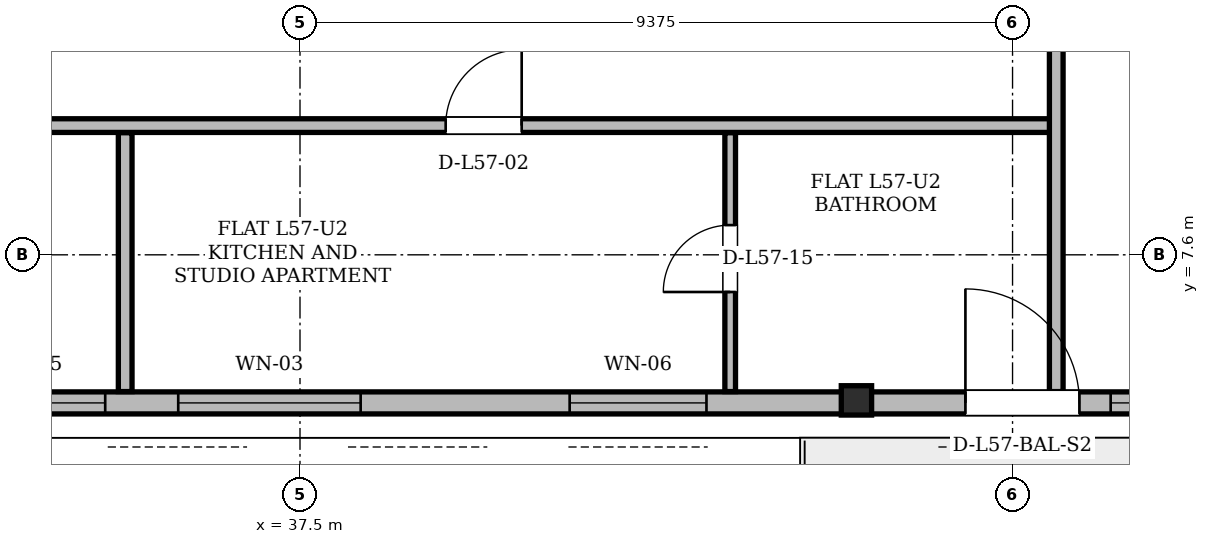
"""IFC4 building model, lengths in metres.
Left out: names, types, materials, properties, quantities, classifications, styles, units other than length and angle.
Written with IfcOpenShell. Run it as: python <this file> out.ifc"""

import sys

from ifc_helpers import new_model, si_unit, direction, frame, frame_2d, origin, origin_2d, place, context, subcontext, project, spatial, rectangle, i_section, extrude, element, fill, save


model = new_model("IFC4")
c1 = context("Model", 3, precision=1e-05, world=origin(), true_north=direction((0.0, 1.0)))
c2 = subcontext(c1, "Body", "Model", "MODEL_VIEW")
j1 = project(units=[si_unit("LENGTHUNIT", "METRE"), si_unit("PLANEANGLEUNIT", "RADIAN")], contexts=[c1])
p1 = place(None, origin())
s1 = spatial("IfcSite", under=j1, at=p1, CompositionType="ELEMENT")
p2 = place(p1, origin())
s2 = spatial("IfcBuilding", under=s1, at=p2, CompositionType="ELEMENT")
p3 = place(p2, frame((0.0, 0.0, 216.3)))
s3 = spatial("IfcBuildingStorey", under=s2, at=p3, CompositionType="ELEMENT", Elevation=216.3)
p4 = place(p3, frame((44.816, 5.652, 0.004), z_axis=(0.003058814159, 0.018488832247, 0.999824387949), x_axis=(-0.986589285408, 0.163222492071, 0.0)))
e1 = element("IfcColumn", 1, at=p4, inside=s3, PredefinedType="COLUMN", context=c2, shape_type="SweptSolid", body=[
    extrude(i_section(OverallWidth=0.399, OverallDepth=0.386, WebThickness=0.021, FlangeThickness=0.033, at=origin_2d()), origin(), (0.0, 0.0, 1.0), 3.592),
])
p5 = place(p3, frame((19.211, 5.652, 0.0), z_axis=(0.0, 0.0, 1.0), x_axis=(1.0, 0.0, 0.0)))
e2 = element("IfcWall", 2, at=p5, inside=s3, PredefinedType="SOLIDWALL", context=c2, shape_type="SweptSolid", body=[
    extrude(rectangle(XDim=36.579, YDim=0.29, at=frame_2d((18.289, 0.0))), origin(), (0.0, 0.0, 1.0), 2.677),
])
p6 = place(p5, frame((3.639, 0.0, 0.0)))
e3 = element("IfcOpeningElement", 3, at=p6, cuts=e2, PredefinedType="OPENING", context=c2, shape_type="SweptSolid", body=[
    extrude(rectangle(XDim=1.5, YDim=2.2, at=frame_2d((0.75, 1.1))), frame((0.0, 0.145, 0.0), z_axis=(0.0, -1.0, 0.0), x_axis=(1.0, 0.0, 0.0)), (0.0, 0.0, 1.0), 0.29),
])
p7 = place(p5, frame((27.044, 0.0, 0.0)))
e4 = element("IfcOpeningElement", 4, at=p7, cuts=e2, PredefinedType="OPENING", context=c2, shape_type="SweptSolid", body=[
    extrude(rectangle(XDim=1.5, YDim=2.2, at=frame_2d((0.75, 1.1))), frame((0.0, 0.145, 0.0), z_axis=(0.0, -1.0, 0.0), x_axis=(1.0, 0.0, 0.0)), (0.0, 0.0, 1.0), 0.29),
])
p8 = place(p5, frame((1.331, 0.0, 0.85)))
e5 = element("IfcOpeningElement", 5, at=p8, cuts=e2, PredefinedType="OPENING", context=c2, shape_type="SweptSolid", body=[
    extrude(rectangle(XDim=1.2, YDim=1.48, at=frame_2d((0.6, 0.74))), frame((0.0, 0.145, 0.0), z_axis=(0.0, -1.0, 0.0), x_axis=(1.0, 0.0, 0.0)), (0.0, 0.0, 1.0), 0.29),
])
p9 = place(p5, frame((7.304, 0.0, 0.85)))
e6 = element("IfcOpeningElement", 6, at=p9, cuts=e2, PredefinedType="OPENING", context=c2, shape_type="SweptSolid", body=[
    extrude(rectangle(XDim=2.2, YDim=1.717, at=frame_2d((1.1, 0.858))), frame((0.0, 0.145, 0.0), z_axis=(0.0, -1.0, 0.0), x_axis=(1.0, 0.0, 0.0)), (0.0, 0.0, 1.0), 0.29),
])
p10 = place(p5, frame((13.726, 0.0, 0.85)))
e7 = element("IfcOpeningElement", 7, at=p10, cuts=e2, PredefinedType="OPENING", context=c2, shape_type="SweptSolid", body=[
    extrude(rectangle(XDim=2.0, YDim=1.717, at=frame_2d((1.0, 0.858))), frame((0.0, 0.145, 0.0), z_axis=(0.0, -1.0, 0.0), x_axis=(1.0, 0.0, 0.0)), (0.0, 0.0, 1.0), 0.29),
])
p11 = place(p5, frame((16.687, 0.0, 0.85)))
e8 = element("IfcOpeningElement", 8, at=p11, cuts=e2, PredefinedType="OPENING", context=c2, shape_type="SweptSolid", body=[
    extrude(rectangle(XDim=2.4, YDim=1.717, at=frame_2d((1.2, 0.858))), frame((0.0, 0.145, 0.0), z_axis=(0.0, -1.0, 0.0), x_axis=(1.0, 0.0, 0.0)), (0.0, 0.0, 1.0), 0.29),
])
p12 = place(p5, frame((21.837, 0.0, 0.85)))
e9 = element("IfcOpeningElement", 9, at=p12, cuts=e2, PredefinedType="OPENING", context=c2, shape_type="SweptSolid", body=[
    extrude(rectangle(XDim=1.8, YDim=1.717, at=frame_2d((0.9, 0.858))), frame((0.0, 0.145, 0.0), z_axis=(0.0, -1.0, 0.0), x_axis=(1.0, 0.0, 0.0)), (0.0, 0.0, 1.0), 0.29),
])
p13 = place(p5, frame((28.955, 0.0, 0.85)))
e10 = element("IfcOpeningElement", 10, at=p13, cuts=e2, PredefinedType="OPENING", context=c2, shape_type="SweptSolid", body=[
    extrude(rectangle(XDim=1.2, YDim=1.48, at=frame_2d((0.6, 0.74))), frame((0.0, 0.145, 0.0), z_axis=(0.0, -1.0, 0.0), x_axis=(1.0, 0.0, 0.0)), (0.0, 0.0, 1.0), 0.29),
])
p14 = place(p5, frame((31.847, 0.0, 0.85)))
e11 = element("IfcOpeningElement", 11, at=p14, cuts=e2, PredefinedType="OPENING", context=c2, shape_type="SweptSolid", body=[
    extrude(rectangle(XDim=2.6, YDim=1.717, at=frame_2d((1.3, 0.858))), frame((0.0, 0.145, 0.0), z_axis=(0.0, -1.0, 0.0), x_axis=(1.0, 0.0, 0.0)), (0.0, 0.0, 1.0), 0.29),
])
p15 = place(p3, frame((25.6, 9.3, 0.0), z_axis=(0.0, 0.0, 1.0), x_axis=(1.0, 0.0, 0.0)))
e12 = element("IfcWall", 12, at=p15, inside=s3, PredefinedType="PARTITIONING", context=c2, shape_type="SweptSolid", body=[
    extrude(rectangle(XDim=21.85, YDim=0.18, at=frame_2d((10.925, 0.0))), origin(), (0.0, 0.0, 1.0), 2.913),
])
p16 = place(p15, frame((2.191, 0.0, 0.0)))
e13 = element("IfcOpeningElement", 13, at=p16, cuts=e12, PredefinedType="OPENING", context=c2, shape_type="SweptSolid", body=[
    extrude(rectangle(XDim=1.0, YDim=2.18, at=frame_2d((0.5, 1.09))), frame((0.0, 0.09, 0.0), z_axis=(0.0, -1.0, 0.0), x_axis=(1.0, 0.0, 0.0)), (0.0, 0.0, 1.0), 0.18),
])
p17 = place(p15, frame((13.817, 0.0, 0.0)))
e14 = element("IfcOpeningElement", 14, at=p17, cuts=e12, PredefinedType="OPENING", context=c2, shape_type="SweptSolid", body=[
    extrude(rectangle(XDim=1.0, YDim=2.18, at=frame_2d((0.5, 1.09))), frame((0.0, 0.09, 0.0), z_axis=(0.0, -1.0, 0.0), x_axis=(1.0, 0.0, 0.0)), (0.0, 0.0, 1.0), 0.18),
])
p18 = place(p3, frame((35.2, 5.801, 0.0), z_axis=(0.0, 0.0, 1.0), x_axis=(0.0, 1.0, 0.0)))
e15 = element("IfcWall", 15, at=p18, inside=s3, PredefinedType="PARTITIONING", context=c2, shape_type="SweptSolid", body=[
    extrude(rectangle(XDim=3.405, YDim=0.18, at=frame_2d((1.703, 0.0))), origin(), (0.0, 0.0, 1.0), 3.38),
])
p19 = place(p3, frame((43.16, 5.801, 0.0), z_axis=(0.0, 0.0, 1.0), x_axis=(0.0, 1.0, 0.0)))
e16 = element("IfcWall", 16, at=p19, inside=s3, PredefinedType="PARTITIONING", context=c2, shape_type="SweptSolid", body=[
    extrude(rectangle(XDim=3.405, YDim=0.14, at=frame_2d((1.703, 0.0))), origin(), (0.0, 0.0, 1.0), 3.38),
])
p20 = place(p19, frame((1.31, 0.0, 0.0)))
e17 = element("IfcOpeningElement", 17, at=p20, cuts=e16, PredefinedType="OPENING", context=c2, shape_type="SweptSolid", body=[
    extrude(rectangle(XDim=0.88, YDim=2.08, at=frame_2d((0.44, 1.04))), frame((0.0, 0.07, 0.0), z_axis=(0.0, -1.0, 0.0), x_axis=(1.0, 0.0, 0.0)), (0.0, 0.0, 1.0), 0.14),
])
p21 = place(p3, frame((47.45, 5.801, 0.0), z_axis=(0.0, 0.0, 1.0), x_axis=(0.0, 1.0, 0.0)))
e18 = element("IfcWall", 18, at=p21, inside=s3, PredefinedType="PARTITIONING", context=c2, shape_type="SweptSolid", body=[
    extrude(rectangle(XDim=25.664, YDim=0.18, at=frame_2d((12.832, 0.0))), origin(), (0.0, 0.0, 1.0), 2.913),
])
p22 = place(p21, frame((9.122, 0.0, 0.0)))
e19 = element("IfcOpeningElement", 19, at=p22, cuts=e18, PredefinedType="OPENING", context=c2, shape_type="SweptSolid", body=[
    extrude(rectangle(XDim=1.0, YDim=2.18, at=frame_2d((0.5, 1.09))), frame((0.0, 0.09, 0.0), z_axis=(0.0, -1.0, 0.0), x_axis=(1.0, 0.0, 0.0)), (0.0, 0.0, 1.0), 0.18),
])
p23 = place(p21, frame((15.912, 0.0, 0.0)))
e20 = element("IfcOpeningElement", 20, at=p23, cuts=e18, PredefinedType="OPENING", context=c2, shape_type="SweptSolid", body=[
    extrude(rectangle(XDim=1.0, YDim=2.18, at=frame_2d((0.5, 1.09))), frame((0.0, 0.09, 0.0), z_axis=(0.0, -1.0, 0.0), x_axis=(1.0, 0.0, 0.0)), (0.0, 0.0, 1.0), 0.18),
])
p24 = place(p7, origin())
e21 = element("IfcDoor", 21, at=p24, inside=s3, OperationType="SINGLE_SWING_LEFT", PredefinedType="DOOR", context=c2, shape_type="SweptSolid", body=[
    extrude(rectangle(XDim=1.5, YDim=2.2, at=frame_2d((0.75, 1.1))), frame((0.0, 0.025, 0.0), z_axis=(0.0, -1.0, 0.0), x_axis=(1.0, 0.0, 0.0)), (0.0, 0.0, 1.0), 0.05),
])
fill(e4, e21)
p25 = place(p10, origin())
e22 = element("IfcWindow", 22, at=p25, inside=s3, PartitioningType="SINGLE_PANEL", PredefinedType="WINDOW", context=c2, shape_type="SweptSolid", body=[
    extrude(rectangle(XDim=2.0, YDim=1.717, at=frame_2d((1.0, 0.858))), frame((0.0, 0.03, 0.0), z_axis=(0.0, -1.0, 0.0), x_axis=(1.0, 0.0, 0.0)), (0.0, 0.0, 1.0), 0.06),
])
fill(e7, e22)
p26 = place(p11, origin())
e23 = element("IfcWindow", 23, at=p26, inside=s3, PartitioningType="SINGLE_PANEL", PredefinedType="WINDOW", context=c2, shape_type="SweptSolid", body=[
    extrude(rectangle(XDim=2.4, YDim=1.717, at=frame_2d((1.2, 0.858))), frame((0.0, 0.03, 0.0), z_axis=(0.0, -1.0, 0.0), x_axis=(1.0, 0.0, 0.0)), (0.0, 0.0, 1.0), 0.06),
])
fill(e8, e23)
p27 = place(p12, origin())
e24 = element("IfcWindow", 24, at=p27, inside=s3, PartitioningType="SINGLE_PANEL", PredefinedType="WINDOW", context=c2, shape_type="SweptSolid", body=[
    extrude(rectangle(XDim=1.8, YDim=1.717, at=frame_2d((0.9, 0.858))), frame((0.0, 0.03, 0.0), z_axis=(0.0, -1.0, 0.0), x_axis=(1.0, 0.0, 0.0)), (0.0, 0.0, 1.0), 0.06),
])
fill(e9, e24)
p28 = place(p13, origin())
e25 = element("IfcWindow", 25, at=p28, inside=s3, PartitioningType="SINGLE_PANEL", PredefinedType="WINDOW", context=c2, shape_type="SweptSolid", body=[
    extrude(rectangle(XDim=1.2, YDim=1.48, at=frame_2d((0.6, 0.74))), frame((0.0, 0.03, 0.0), z_axis=(0.0, -1.0, 0.0), x_axis=(1.0, 0.0, 0.0)), (0.0, 0.0, 1.0), 0.06),
])
fill(e10, e25)
p29 = place(p17, origin())
e26 = element("IfcDoor", 26, at=p29, inside=s3, OperationType="SINGLE_SWING_RIGHT", PredefinedType="DOOR", context=c2, shape_type="SweptSolid", body=[
    extrude(rectangle(XDim=1.0, YDim=2.18, at=frame_2d((0.5, 1.09))), frame((0.0, 0.025, 0.0), z_axis=(0.0, -1.0, 0.0), x_axis=(1.0, 0.0, 0.0)), (0.0, 0.0, 1.0), 0.05),
])
fill(e14, e26)
p30 = place(p20, origin())
e27 = element("IfcDoor", 27, at=p30, inside=s3, OperationType="SINGLE_SWING_LEFT", PredefinedType="DOOR", context=c2, shape_type="SweptSolid", body=[
    extrude(rectangle(XDim=0.88, YDim=2.08, at=frame_2d((0.44, 1.04))), frame((0.0, 0.025, 0.0), z_axis=(0.0, -1.0, 0.0), x_axis=(1.0, 0.0, 0.0)), (0.0, 0.0, 1.0), 0.05),
])
fill(e17, e27)
save(model, sys.argv[1])
